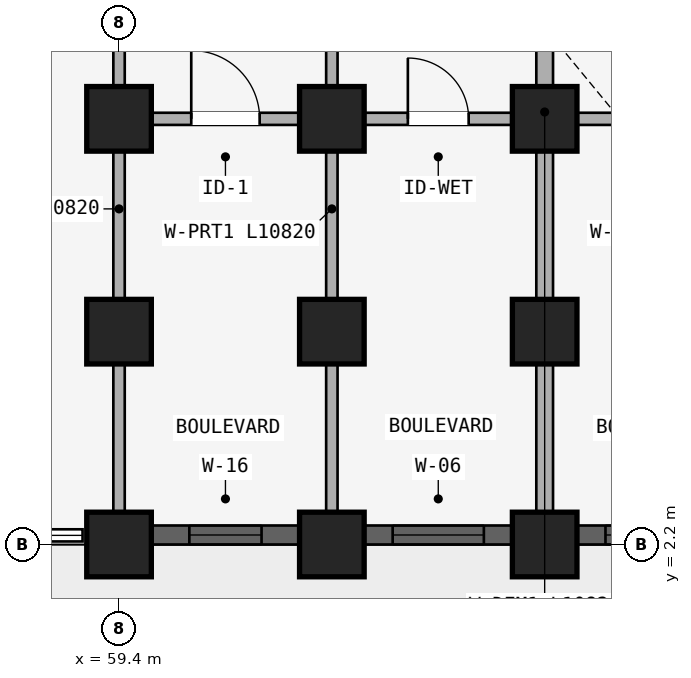
"""IFC4 building model, lengths in metres.
Left out: names, types, materials, properties, quantities, classifications, styles, units other than length and angle.
Written with IfcOpenShell. Run it as: python <this file> out.ifc"""

import sys

from ifc_helpers import new_model, si_unit, direction, frame, frame_2d, origin, origin_2d, place, context, subcontext, project, spatial, rectangle, extrude, element, fill, save


model = new_model("IFC4")
c1 = context("Model", 3, precision=1e-05, world=origin(), true_north=direction((0.0, 1.0)))
c2 = subcontext(c1, "Body", "Model", "MODEL_VIEW")
j1 = project(units=[si_unit("LENGTHUNIT", "METRE"), si_unit("PLANEANGLEUNIT", "RADIAN")], contexts=[c1])
p1 = place(None, origin())
s1 = spatial("IfcSite", under=j1, at=p1, CompositionType="ELEMENT")
p2 = place(p1, origin())
s2 = spatial("IfcBuilding", under=s1, at=p2, CompositionType="ELEMENT")
p3 = place(p2, origin())
s3 = spatial("IfcBuildingStorey", under=s2, at=p3, CompositionType="ELEMENT", Elevation=0.0)
for number, where, z_axis, x_axis in (
    (1, (59.4, 7.8, 0.0), (0.0, 0.0, 1.0), (1.0, 0.0, 0.0)),
    (2, (59.4, 5.0, 0.0), (0.0, 0.0, 1.0), (1.0, 0.0, 0.0)),
    (3, (59.4, 2.2, 0.0), (0.0, 0.0, 1.0), (1.0, 0.0, 0.0)),
    (4, (62.2, 7.8, 0.0), (0.0, 0.0, 1.0), (1.0, 0.0, 0.0)),
    (5, (62.2, 5.0, 0.0), (0.0, 0.0, 1.0), (1.0, 0.0, 0.0)),
    (6, (62.2, 2.2, 0.0), (0.0, 0.0, 1.0), (1.0, 0.0, 0.0)),
    (7, (65.0, 7.8, 0.0), (0.0, 0.0, 1.0), (1.0, 0.0, 0.0)),
    (8, (65.0, 5.0, 0.0), (0.0, 0.0, 1.0), (1.0, 0.0, 0.0)),
    (9, (65.0, 2.2, 0.0), (0.0, 0.0, 1.0), (1.0, 0.0, 0.0)),
):
    element("IfcColumn", number, at=place(p3, frame(where, z_axis=z_axis, x_axis=x_axis)), inside=s3, PredefinedType="COLUMN", context=c2, shape_type="SweptSolid", body=[
        extrude(rectangle(XDim=0.85, YDim=0.85, at=origin_2d()), origin(), (0.0, 0.0, 1.0), 4.15),
    ])
p4 = place(p3, frame((59.48, 7.8, 0.0), z_axis=(0.0, 0.0, 1.0), x_axis=(1.0, 0.0, 0.0)))
e10 = element("IfcWall", 10, at=p4, inside=s3, PredefinedType="PLUMBINGWALL", context=c2, shape_type="SweptSolid", body=[
    extrude(rectangle(XDim=2.64, YDim=0.16, at=frame_2d((1.32, 0.0))), origin(), (0.0, 0.0, 1.0), 3.492),
])
p5 = place(p4, frame((0.87, 0.0, 0.0)))
e11 = element("IfcOpeningElement", 11, at=p5, cuts=e10, PredefinedType="OPENING", context=c2, shape_type="SweptSolid", body=[
    extrude(rectangle(XDim=0.9, YDim=2.1, at=frame_2d((0.45, 1.05))), frame((0.0, 0.09, 0.0), z_axis=(0.0, -1.0, 0.0), x_axis=(1.0, 0.0, 0.0)), (0.0, 0.0, 1.0), 0.18),
])
p6 = place(p3, frame((62.28, 7.8, 0.0), z_axis=(0.0, 0.0, 1.0), x_axis=(1.0, 0.0, 0.0)))
e12 = element("IfcWall", 12, at=p6, inside=s3, PredefinedType="PLUMBINGWALL", context=c2, shape_type="SweptSolid", body=[
    extrude(rectangle(XDim=2.64, YDim=0.16, at=frame_2d((1.32, 0.0))), origin(), (0.0, 0.0, 1.0), 3.492),
])
p7 = place(p6, frame((0.92, 0.0, 0.0)))
e13 = element("IfcOpeningElement", 13, at=p7, cuts=e12, PredefinedType="OPENING", context=c2, shape_type="SweptSolid", body=[
    extrude(rectangle(XDim=0.8, YDim=2.1, at=frame_2d((0.4, 1.05))), frame((0.0, 0.09, 0.0), z_axis=(0.0, -1.0, 0.0), x_axis=(1.0, 0.0, 0.0)), (0.0, 0.0, 1.0), 0.18),
])
p8 = place(p3, frame((65.08, 7.8, 0.0), z_axis=(0.0, 0.0, 1.0), x_axis=(1.0, 0.0, 0.0)))
e14 = element("IfcWall", 14, at=p8, inside=s3, PredefinedType="PLUMBINGWALL", context=c2, shape_type="SweptSolid", body=[
    extrude(rectangle(XDim=2.64, YDim=0.16, at=frame_2d((1.32, 0.0))), origin(), (0.0, 0.0, 1.0), 3.492),
])
p9 = place(p8, frame((0.87, 0.0, 0.0)))
e15 = element("IfcOpeningElement", 15, at=p9, cuts=e14, PredefinedType="OPENING", context=c2, shape_type="SweptSolid", body=[
    extrude(rectangle(XDim=0.9, YDim=2.1, at=frame_2d((0.45, 1.05))), frame((0.0, 0.09, 0.0), z_axis=(0.0, -1.0, 0.0), x_axis=(1.0, 0.0, 0.0)), (0.0, 0.0, 1.0), 0.18),
])
p10 = place(p3, frame((59.4, 13.3, 0.0), z_axis=(0.0, 0.0, 1.0), x_axis=(0.0, -1.0, 0.0)))
e16 = element("IfcWall", 16, at=p10, inside=s3, PredefinedType="PARTITIONING", context=c2, shape_type="SweptSolid", body=[
    extrude(rectangle(XDim=10.82, YDim=0.15, at=frame_2d((5.41, 0.0))), origin(), (0.0, 0.0, 1.0), 3.492),
])
p11 = place(p10, frame((0.899, 0.0, 0.0)))
e17 = element("IfcOpeningElement", 17, at=p11, cuts=e16, PredefinedType="OPENING", context=c2, shape_type="SweptSolid", body=[
    extrude(rectangle(XDim=0.8, YDim=2.1, at=frame_2d((0.4, 1.05))), frame((0.0, 0.085, 0.0), z_axis=(0.0, -1.0, 0.0), x_axis=(1.0, 0.0, 0.0)), (0.0, 0.0, 1.0), 0.17),
])
p12 = place(p3, frame((62.2, 13.3, 0.0), z_axis=(0.0, 0.0, 1.0), x_axis=(0.0, -1.0, 0.0)))
e18 = element("IfcWall", 18, at=p12, inside=s3, PredefinedType="PARTITIONING", context=c2, shape_type="SweptSolid", body=[
    extrude(rectangle(XDim=10.82, YDim=0.15, at=frame_2d((5.41, 0.0))), origin(), (0.0, 0.0, 1.0), 3.492),
])
p13 = place(p12, frame((0.899, 0.0, 0.0)))
e19 = element("IfcOpeningElement", 19, at=p13, cuts=e18, PredefinedType="OPENING", context=c2, shape_type="SweptSolid", body=[
    extrude(rectangle(XDim=0.8, YDim=2.1, at=frame_2d((0.4, 1.05))), frame((0.0, 0.085, 0.0), z_axis=(0.0, -1.0, 0.0), x_axis=(1.0, 0.0, 0.0)), (0.0, 0.0, 1.0), 0.17),
])
p14 = place(p3, frame((65.0, 13.3, 0.0), z_axis=(0.0, 0.0, 1.0), x_axis=(0.0, -1.0, 0.0)))
e20 = element("IfcWall", 20, at=p14, inside=s3, PredefinedType="STANDARD", context=c2, shape_type="SweptSolid", body=[
    extrude(rectangle(XDim=10.82, YDim=0.22, at=frame_2d((5.41, 0.0))), origin(), (0.0, 0.0, 1.0), 3.492),
])
p15 = place(p3, frame((59.829, 2.325, 0.0), z_axis=(0.0, 0.0, 1.0), x_axis=(1.0, 0.0, 0.0)))
e21 = element("IfcWall", 21, at=p15, inside=s3, PredefinedType="STANDARD", context=c2, shape_type="SweptSolid", body=[
    extrude(rectangle(XDim=1.943, YDim=0.25, at=frame_2d((0.971, 0.0))), origin(), (0.0, 0.0, 1.0), 3.692),
])
p16 = place(p15, frame((0.497, 0.0, 0.88)))
e22 = element("IfcOpeningElement", 22, at=p16, cuts=e21, PredefinedType="OPENING", context=c2, shape_type="SweptSolid", body=[
    extrude(rectangle(XDim=0.95, YDim=1.35, at=frame_2d((0.475, 0.675))), frame((0.0, 0.135, 0.0), z_axis=(0.0, -1.0, 0.0), x_axis=(1.0, 0.0, 0.0)), (0.0, 0.0, 1.0), 0.27),
])
p17 = place(p3, frame((62.628, 2.325, 0.0), z_axis=(0.0, 0.0, 1.0), x_axis=(1.0, 0.0, 0.0)))
e23 = element("IfcWall", 23, at=p17, inside=s3, PredefinedType="STANDARD", context=c2, shape_type="SweptSolid", body=[
    extrude(rectangle(XDim=1.943, YDim=0.25, at=frame_2d((0.972, 0.0))), origin(), (0.0, 0.0, 1.0), 3.692),
])
p18 = place(p17, frame((0.372, 0.0, 0.88)))
e24 = element("IfcOpeningElement", 24, at=p18, cuts=e23, PredefinedType="OPENING", context=c2, shape_type="SweptSolid", body=[
    extrude(rectangle(XDim=1.2, YDim=1.5, at=frame_2d((0.6, 0.75))), frame((0.0, 0.135, 0.0), z_axis=(0.0, -1.0, 0.0), x_axis=(1.0, 0.0, 0.0)), (0.0, 0.0, 1.0), 0.27),
])
p19 = place(p3, frame((65.428, 2.325, 0.0), z_axis=(0.0, 0.0, 1.0), x_axis=(1.0, 0.0, 0.0)))
e25 = element("IfcWall", 25, at=p19, inside=s3, PredefinedType="STANDARD", context=c2, shape_type="SweptSolid", body=[
    extrude(rectangle(XDim=1.943, YDim=0.25, at=frame_2d((0.972, 0.0))), origin(), (0.0, 0.0, 1.0), 3.692),
])
p20 = place(p19, frame((0.372, 0.0, 0.88)))
e26 = element("IfcOpeningElement", 26, at=p20, cuts=e25, PredefinedType="OPENING", context=c2, shape_type="SweptSolid", body=[
    extrude(rectangle(XDim=1.2, YDim=1.5, at=frame_2d((0.6, 0.75))), frame((0.0, 0.135, 0.0), z_axis=(0.0, -1.0, 0.0), x_axis=(1.0, 0.0, 0.0)), (0.0, 0.0, 1.0), 0.27),
])
p21 = place(p16, origin())
e27 = element("IfcWindow", 27, at=p21, inside=s3, PartitioningType="SINGLE_PANEL", PredefinedType="WINDOW", context=c2, shape_type="SweptSolid", body=[
    extrude(rectangle(XDim=0.95, YDim=1.35, at=frame_2d((0.475, 0.675))), frame((0.0, 0.03, 0.0), z_axis=(0.0, -1.0, 0.0), x_axis=(1.0, 0.0, 0.0)), (0.0, 0.0, 1.0), 0.06),
])
fill(e22, e27)
p22 = place(p18, origin())
e28 = element("IfcWindow", 28, at=p22, inside=s3, PartitioningType="SINGLE_PANEL", PredefinedType="WINDOW", context=c2, shape_type="SweptSolid", body=[
    extrude(rectangle(XDim=1.2, YDim=1.5, at=frame_2d((0.6, 0.75))), frame((0.0, 0.03, 0.0), z_axis=(0.0, -1.0, 0.0), x_axis=(1.0, 0.0, 0.0)), (0.0, 0.0, 1.0), 0.06),
])
fill(e24, e28)
p23 = place(p20, origin())
e29 = element("IfcWindow", 29, at=p23, inside=s3, PartitioningType="SINGLE_PANEL", PredefinedType="WINDOW", context=c2, shape_type="SweptSolid", body=[
    extrude(rectangle(XDim=1.2, YDim=1.5, at=frame_2d((0.6, 0.75))), frame((0.0, 0.03, 0.0), z_axis=(0.0, -1.0, 0.0), x_axis=(1.0, 0.0, 0.0)), (0.0, 0.0, 1.0), 0.06),
])
fill(e26, e29)
p24 = place(p5, origin())
e30 = element("IfcDoor", 30, at=p24, inside=s3, OperationType="SINGLE_SWING_LEFT", PredefinedType="DOOR", context=c2, shape_type="SweptSolid", body=[
    extrude(rectangle(XDim=0.9, YDim=2.1, at=frame_2d((0.45, 1.05))), frame((0.0, 0.025, 0.0), z_axis=(0.0, -1.0, 0.0), x_axis=(1.0, 0.0, 0.0)), (0.0, 0.0, 1.0), 0.05),
])
fill(e11, e30)
p25 = place(p7, origin())
e31 = element("IfcDoor", 31, at=p25, inside=s3, OperationType="SINGLE_SWING_LEFT", PredefinedType="DOOR", context=c2, shape_type="SweptSolid", body=[
    extrude(rectangle(XDim=0.8, YDim=2.1, at=frame_2d((0.4, 1.05))), frame((0.0, 0.025, 0.0), z_axis=(0.0, -1.0, 0.0), x_axis=(1.0, 0.0, 0.0)), (0.0, 0.0, 1.0), 0.05),
])
fill(e13, e31)
save(model, sys.argv[1])
